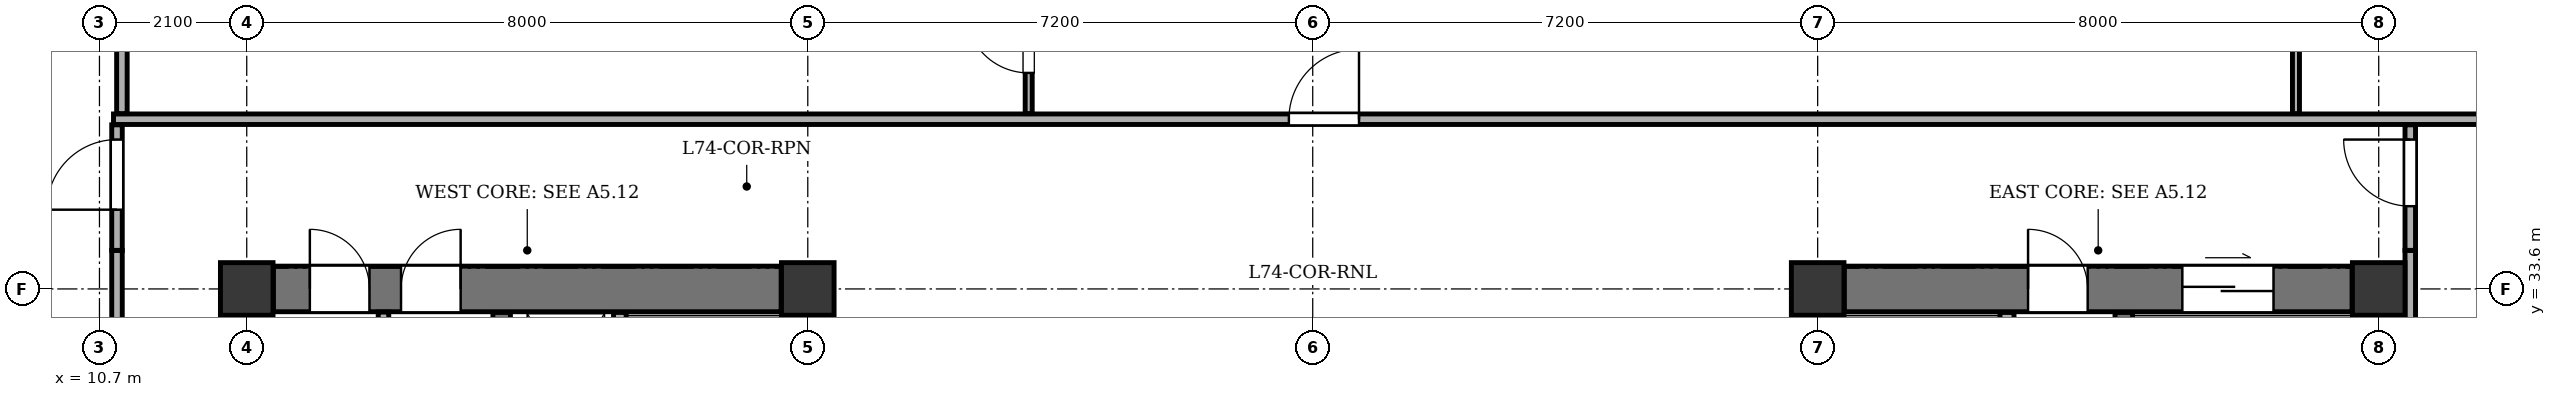
"""IFC4 building model, lengths in metres.
Left out: names, types, materials, properties, quantities, classifications, styles, units other than length and angle.
Written with IfcOpenShell. Run it as: python <this file> out.ifc"""

import sys

from ifc_helpers import new_model, si_unit, direction, frame, frame_2d, origin, origin_2d, place, context, subcontext, project, spatial, rectangle, extrude, element, fill, save


model = new_model("IFC4")
c1 = context("Model", 3, precision=1e-05, world=origin(), true_north=direction((0.0, 1.0)))
c2 = subcontext(c1, "Body", "Model", "MODEL_VIEW")
j1 = project(units=[si_unit("LENGTHUNIT", "METRE"), si_unit("PLANEANGLEUNIT", "RADIAN")], contexts=[c1])
p1 = place(None, origin())
s1 = spatial("IfcSite", under=j1, at=p1, CompositionType="ELEMENT")
p2 = place(p1, origin())
s2 = spatial("IfcBuilding", under=s1, at=p2, CompositionType="ELEMENT")
p3 = place(p2, frame((0.0, 0.0, 278.9)))
s3 = spatial("IfcBuildingStorey", under=s2, at=p3, CompositionType="ELEMENT", Elevation=278.9)
for number, where, z_axis, x_axis in (
    (1, (12.8, 33.6, 0.0), (0.0, 0.0, 1.0), (1.0, 0.0, 0.0)),
    (2, (20.8, 33.6, 0.0), (0.0, 0.0, 1.0), (1.0, 0.0, 0.0)),
    (3, (35.2, 33.6, 0.0), (0.0, 0.0, 1.0), (1.0, 0.0, 0.0)),
    (4, (43.2, 33.6, 0.0), (0.0, 0.0, 1.0), (1.0, 0.0, 0.0)),
):
    element("IfcColumn", number, at=place(p3, frame(where, z_axis=z_axis, x_axis=x_axis)), inside=s3, PredefinedType="COLUMN", context=c2, shape_type="SweptSolid", body=[
        extrude(rectangle(XDim=0.75, YDim=0.75, at=origin_2d()), origin(), (0.0, 0.0, 1.0), 3.4),
    ])
p4 = place(p3, frame((12.8, 21.18, 0.0), z_axis=(0.0, 0.0, 1.0), x_axis=(0.0, 1.0, 0.0)))
e5 = element("IfcWall", 5, at=p4, inside=s3, PredefinedType="SHEAR", context=c2, shape_type="SweptSolid", body=[
    extrude(rectangle(XDim=12.04, YDim=0.65, at=frame_2d((6.02, 0.0))), origin(), (0.0, 0.0, 1.0), 2.95),
])
p5 = place(p3, frame((13.18, 33.6, 0.0), z_axis=(0.0, 0.0, 1.0), x_axis=(1.0, 0.0, 0.0)))
e6 = element("IfcWall", 6, at=p5, inside=s3, PredefinedType="SHEAR", context=c2, shape_type="SweptSolid", body=[
    extrude(rectangle(XDim=7.24, YDim=0.65, at=frame_2d((3.62, 0.0))), origin(), (0.0, 0.0, 1.0), 2.95),
])
p6 = place(p5, frame((0.52, 0.0, 0.0)))
e7 = element("IfcOpeningElement", 7, at=p6, cuts=e6, PredefinedType="OPENING", context=c2, shape_type="SweptSolid", body=[
    extrude(rectangle(XDim=0.85, YDim=2.02, at=frame_2d((0.425, 1.01))), frame((0.0, 0.335, 0.0), z_axis=(0.0, -1.0, 0.0), x_axis=(1.0, 0.0, 0.0)), (0.0, 0.0, 1.0), 0.67),
])
p7 = place(p5, frame((1.82, 0.0, 0.0)))
e8 = element("IfcOpeningElement", 8, at=p7, cuts=e6, PredefinedType="OPENING", context=c2, shape_type="SweptSolid", body=[
    extrude(rectangle(XDim=0.85, YDim=2.02, at=frame_2d((0.425, 1.01))), frame((0.0, 0.335, 0.0), z_axis=(0.0, -1.0, 0.0), x_axis=(1.0, 0.0, 0.0)), (0.0, 0.0, 1.0), 0.67),
])
p8 = place(p3, frame((20.8, 31.1, 0.0), z_axis=(0.0, 0.0, 1.0), x_axis=(0.0, 1.0, 0.0)))
e9 = element("IfcWall", 9, at=p8, inside=s3, PredefinedType="SHEAR", context=c2, shape_type="SweptSolid", body=[
    extrude(rectangle(XDim=2.12, YDim=0.65, at=frame_2d((1.06, 0.0))), origin(), (0.0, 0.0, 1.0), 2.95),
])
p9 = place(p8, frame((0.4, 0.0, 0.0)))
e10 = element("IfcOpeningElement", 10, at=p9, cuts=e9, PredefinedType="OPENING", context=c2, shape_type="SweptSolid", body=[
    extrude(rectangle(XDim=1.1, YDim=2.1, at=frame_2d((0.55, 1.05))), frame((0.0, 0.335, 0.0), z_axis=(0.0, -1.0, 0.0), x_axis=(1.0, 0.0, 0.0)), (0.0, 0.0, 1.0), 0.67),
])
p10 = place(p3, frame((16.435, 21.135, 0.0), z_axis=(0.0, 0.0, 1.0), x_axis=(0.0, 1.0, 0.0)))
e11 = element("IfcWall", 11, at=p10, inside=s3, PredefinedType="SHEAR", context=c2, shape_type="SweptSolid", body=[
    extrude(rectangle(XDim=12.13, YDim=0.25, at=frame_2d((6.065, 0.0))), origin(), (0.0, 0.0, 1.0), 2.95),
])
p11 = place(p10, frame((0.515, 0.0, 0.0)))
e12 = element("IfcOpeningElement", 12, at=p11, cuts=e11, PredefinedType="OPENING", context=c2, shape_type="SweptSolid", body=[
    extrude(rectangle(XDim=1.2, YDim=2.15, at=frame_2d((0.6, 1.075))), frame((0.0, 0.135, 0.0), z_axis=(0.0, -1.0, 0.0), x_axis=(1.0, 0.0, 0.0)), (0.0, 0.0, 1.0), 0.27),
])
p12 = place(p10, frame((2.665, 0.0, 0.0)))
e13 = element("IfcOpeningElement", 13, at=p12, cuts=e11, PredefinedType="OPENING", context=c2, shape_type="SweptSolid", body=[
    extrude(rectangle(XDim=1.15, YDim=2.15, at=frame_2d((0.575, 1.075))), frame((0.0, 0.135, 0.0), z_axis=(0.0, -1.0, 0.0), x_axis=(1.0, 0.0, 0.0)), (0.0, 0.0, 1.0), 0.27),
])
p13 = place(p3, frame((18.12, 31.17, 0.0), z_axis=(0.0, 0.0, 1.0), x_axis=(0.0, 1.0, 0.0)))
e14 = element("IfcWall", 14, at=p13, inside=s3, PredefinedType="PARTITIONING", context=c2, shape_type="SweptSolid", body=[
    extrude(rectangle(XDim=2.095, YDim=0.18, at=frame_2d((1.047, 0.0))), origin(), (0.0, 0.0, 1.0), 2.95),
])
p14 = place(p3, frame((43.2, 21.18, 0.0), z_axis=(0.0, 0.0, 1.0), x_axis=(0.0, 1.0, 0.0)))
e15 = element("IfcWall", 15, at=p14, inside=s3, PredefinedType="SHEAR", context=c2, shape_type="SweptSolid", body=[
    extrude(rectangle(XDim=12.04, YDim=0.65, at=frame_2d((6.02, 0.0))), origin(), (0.0, 0.0, 1.0), 2.95),
])
p15 = place(p3, frame((35.58, 33.6, 0.0), z_axis=(0.0, 0.0, 1.0), x_axis=(1.0, 0.0, 0.0)))
e16 = element("IfcWall", 16, at=p15, inside=s3, PredefinedType="SHEAR", context=c2, shape_type="SweptSolid", body=[
    extrude(rectangle(XDim=7.24, YDim=0.65, at=frame_2d((3.62, 0.0))), origin(), (0.0, 0.0, 1.0), 2.95),
])
p16 = place(p15, frame((4.82, 0.0, 0.0)))
e17 = element("IfcOpeningElement", 17, at=p16, cuts=e16, PredefinedType="OPENING", context=c2, shape_type="SweptSolid", body=[
    extrude(rectangle(XDim=1.3, YDim=2.15, at=frame_2d((0.65, 1.075))), frame((0.0, 0.335, 0.0), z_axis=(0.0, -1.0, 0.0), x_axis=(1.0, 0.0, 0.0)), (0.0, 0.0, 1.0), 0.67),
])
p17 = place(p15, frame((2.62, 0.0, 0.0)))
e18 = element("IfcOpeningElement", 18, at=p17, cuts=e16, PredefinedType="OPENING", context=c2, shape_type="SweptSolid", body=[
    extrude(rectangle(XDim=0.85, YDim=2.02, at=frame_2d((0.425, 1.01))), frame((0.0, 0.335, 0.0), z_axis=(0.0, -1.0, 0.0), x_axis=(1.0, 0.0, 0.0)), (0.0, 0.0, 1.0), 0.67),
])
p18 = place(p3, frame((35.2, 31.1, 0.0), z_axis=(0.0, 0.0, 1.0), x_axis=(0.0, 1.0, 0.0)))
e19 = element("IfcWall", 19, at=p18, inside=s3, PredefinedType="SHEAR", context=c2, shape_type="SweptSolid", body=[
    extrude(rectangle(XDim=2.12, YDim=0.65, at=frame_2d((1.06, 0.0))), origin(), (0.0, 0.0, 1.0), 2.95),
])
p19 = place(p18, frame((0.4, 0.0, 0.0)))
e20 = element("IfcOpeningElement", 20, at=p19, cuts=e19, PredefinedType="OPENING", context=c2, shape_type="SweptSolid", body=[
    extrude(rectangle(XDim=1.1, YDim=2.1, at=frame_2d((0.55, 1.05))), frame((0.0, 0.335, 0.0), z_axis=(0.0, -1.0, 0.0), x_axis=(1.0, 0.0, 0.0)), (0.0, 0.0, 1.0), 0.67),
])
p20 = place(p3, frame((39.565, 21.135, 0.0), z_axis=(0.0, 0.0, 1.0), x_axis=(0.0, 1.0, 0.0)))
e21 = element("IfcWall", 21, at=p20, inside=s3, PredefinedType="SHEAR", context=c2, shape_type="SweptSolid", body=[
    extrude(rectangle(XDim=12.13, YDim=0.25, at=frame_2d((6.065, 0.0))), origin(), (0.0, 0.0, 1.0), 2.95),
])
p21 = place(p20, frame((0.515, 0.0, 0.0)))
e22 = element("IfcOpeningElement", 22, at=p21, cuts=e21, PredefinedType="OPENING", context=c2, shape_type="SweptSolid", body=[
    extrude(rectangle(XDim=1.2, YDim=2.15, at=frame_2d((0.6, 1.075))), frame((0.0, 0.135, 0.0), z_axis=(0.0, -1.0, 0.0), x_axis=(1.0, 0.0, 0.0)), (0.0, 0.0, 1.0), 0.27),
])
p22 = place(p20, frame((2.665, 0.0, 0.0)))
e23 = element("IfcOpeningElement", 23, at=p22, cuts=e21, PredefinedType="OPENING", context=c2, shape_type="SweptSolid", body=[
    extrude(rectangle(XDim=1.15, YDim=2.15, at=frame_2d((0.575, 1.075))), frame((0.0, 0.135, 0.0), z_axis=(0.0, -1.0, 0.0), x_axis=(1.0, 0.0, 0.0)), (0.0, 0.0, 1.0), 0.27),
])
p23 = place(p3, frame((37.9, 25.27, 0.0), z_axis=(0.0, 0.0, 1.0), x_axis=(0.0, 1.0, 0.0)))
e24 = element("IfcWall", 24, at=p23, inside=s3, PredefinedType="SOLIDWALL", context=c2, shape_type="SweptSolid", body=[
    extrude(rectangle(XDim=7.995, YDim=0.2, at=frame_2d((3.998, 0.0))), origin(), (0.0, 0.0, 1.0), 2.95),
])
p24 = place(p3, frame((14.75, 30.96, 0.0), z_axis=(0.0, 0.0, 1.0), x_axis=(0.0, 1.0, 0.0)))
e25 = element("IfcWall", 25, at=p24, inside=s3, PredefinedType="PARTITIONING", context=c2, shape_type="SweptSolid", body=[
    extrude(rectangle(XDim=2.31, YDim=0.15, at=frame_2d((1.155, 0.0))), origin(), (0.0, 0.0, 1.0), 2.95),
])
p25 = place(p24, frame((0.47, 0.0, 0.0)))
e26 = element("IfcOpeningElement", 26, at=p25, cuts=e25, PredefinedType="OPENING", context=c2, shape_type="SweptSolid", body=[
    extrude(rectangle(XDim=0.85, YDim=2.02, at=frame_2d((0.425, 1.01))), frame((0.0, 0.085, 0.0), z_axis=(0.0, -1.0, 0.0), x_axis=(1.0, 0.0, 0.0)), (0.0, 0.0, 1.0), 0.17),
])
p26 = place(p3, frame((10.9, 36.02, 0.0), z_axis=(0.0, 0.0, 1.0), x_axis=(1.0, 0.0, 0.0)))
e27 = element("IfcWall", 27, at=p26, inside=s3, PredefinedType="PARTITIONING", context=c2, shape_type="SweptSolid", body=[
    extrude(rectangle(XDim=34.52, YDim=0.15, at=frame_2d((17.26, 0.0))), origin(), (0.0, 0.0, 1.0), 2.95),
])
p27 = place(p26, frame((16.76, 0.0, 0.0)))
e28 = element("IfcOpeningElement", 28, at=p27, cuts=e27, PredefinedType="OPENING", context=c2, shape_type="SweptSolid", body=[
    extrude(rectangle(XDim=1.0, YDim=2.1, at=frame_2d((0.5, 1.05))), frame((0.0, 0.085, 0.0), z_axis=(0.0, -1.0, 0.0), x_axis=(1.0, 0.0, 0.0)), (0.0, 0.0, 1.0), 0.17),
])
p28 = place(p3, frame((11.02, 36.1, 0.0), z_axis=(0.0, 0.0, 1.0), x_axis=(0.0, 1.0, 0.0)))
e29 = element("IfcWall", 29, at=p28, inside=s3, PredefinedType="PARTITIONING", context=c2, shape_type="SweptSolid", body=[
    extrude(rectangle(XDim=8.655, YDim=0.15, at=frame_2d((4.327, 0.0))), origin(), (0.0, 0.0, 1.0), 2.95),
])
p29 = place(p3, frame((42.02, 36.1, 0.0), z_axis=(0.0, 0.0, 1.0), x_axis=(0.0, 1.0, 0.0)))
e30 = element("IfcWall", 30, at=p29, inside=s3, PredefinedType="PARTITIONING", context=c2, shape_type="SweptSolid", body=[
    extrude(rectangle(XDim=6.095, YDim=0.1, at=frame_2d((3.047, 0.0))), origin(), (0.0, 0.0, 1.0), 2.575),
])
p30 = place(p29, frame((2.585, 0.0, 0.0)))
e31 = element("IfcOpeningElement", 31, at=p30, cuts=e30, PredefinedType="OPENING", context=c2, shape_type="SweptSolid", body=[
    extrude(rectangle(XDim=0.9, YDim=2.05, at=frame_2d((0.45, 1.025))), frame((0.0, 0.06, 0.0), z_axis=(0.0, -1.0, 0.0), x_axis=(1.0, 0.0, 0.0)), (0.0, 0.0, 1.0), 0.12),
])
p31 = place(p3, frame((23.95, 36.1, 0.0), z_axis=(0.0, 0.0, 1.0), x_axis=(0.0, 1.0, 0.0)))
e32 = element("IfcWall", 32, at=p31, inside=s3, PredefinedType="PARTITIONING", context=c2, shape_type="SweptSolid", body=[
    extrude(rectangle(XDim=6.095, YDim=0.1, at=frame_2d((3.047, 0.0))), origin(), (0.0, 0.0, 1.0), 2.95),
])
p32 = place(p31, frame((0.58, 0.0, 0.0)))
e33 = element("IfcOpeningElement", 33, at=p32, cuts=e32, PredefinedType="OPENING", context=c2, shape_type="SweptSolid", body=[
    extrude(rectangle(XDim=0.9, YDim=2.05, at=frame_2d((0.45, 1.025))), frame((0.0, 0.06, 0.0), z_axis=(0.0, -1.0, 0.0), x_axis=(1.0, 0.0, 0.0)), (0.0, 0.0, 1.0), 0.12),
])
p33 = place(p3, frame((10.95, 20.25, 0.0), z_axis=(0.0, 0.0, 1.0), x_axis=(0.0, 1.0, 0.0)))
e34 = element("IfcWall", 34, at=p33, inside=s3, PredefinedType="PARTITIONING", context=c2, shape_type="SweptSolid", body=[
    extrude(rectangle(XDim=13.9, YDim=0.15, at=frame_2d((6.95, 0.0))), origin(), (0.0, 0.0, 1.0), 2.95),
])
p34 = place(p3, frame((10.95, 34.15, 0.0), z_axis=(0.0, 0.0, 1.0), x_axis=(0.0, 1.0, 0.0)))
e35 = element("IfcWall", 35, at=p34, inside=s3, PredefinedType="PARTITIONING", context=c2, shape_type="SweptSolid", body=[
    extrude(rectangle(XDim=1.79, YDim=0.15, at=frame_2d((0.895, 0.0))), origin(), (0.0, 0.0, 1.0), 2.95),
])
p35 = place(p34, frame((0.58, 0.0, 0.0)))
e36 = element("IfcOpeningElement", 36, at=p35, cuts=e35, PredefinedType="OPENING", context=c2, shape_type="SweptSolid", body=[
    extrude(rectangle(XDim=1.0, YDim=2.1, at=frame_2d((0.5, 1.05))), frame((0.0, 0.085, 0.0), z_axis=(0.0, -1.0, 0.0), x_axis=(1.0, 0.0, 0.0)), (0.0, 0.0, 1.0), 0.17),
])
p36 = place(p3, frame((43.65, 20.88, 0.0), z_axis=(0.0, 0.0, 1.0), x_axis=(0.0, 1.0, 0.0)))
e37 = element("IfcWall", 37, at=p36, inside=s3, PredefinedType="PARTITIONING", context=c2, shape_type="SweptSolid", body=[
    extrude(rectangle(XDim=13.27, YDim=0.15, at=frame_2d((6.635, 0.0))), origin(), (0.0, 0.0, 1.0), 2.95),
])
p37 = place(p3, frame((43.65, 34.15, 0.0), z_axis=(0.0, 0.0, 1.0), x_axis=(0.0, 1.0, 0.0)))
e38 = element("IfcWall", 38, at=p37, inside=s3, PredefinedType="PARTITIONING", context=c2, shape_type="SweptSolid", body=[
    extrude(rectangle(XDim=1.79, YDim=0.15, at=frame_2d((0.895, 0.0))), origin(), (0.0, 0.0, 1.0), 2.95),
])
p38 = place(p37, frame((0.63, 0.0, 0.0)))
e39 = element("IfcOpeningElement", 39, at=p38, cuts=e38, PredefinedType="OPENING", context=c2, shape_type="SweptSolid", body=[
    extrude(rectangle(XDim=0.95, YDim=2.1, at=frame_2d((0.475, 1.05))), frame((0.0, 0.085, 0.0), z_axis=(0.0, -1.0, 0.0), x_axis=(1.0, 0.0, 0.0)), (0.0, 0.0, 1.0), 0.17),
])
p39 = place(p6, origin())
e40 = element("IfcDoor", 40, at=p39, inside=s3, OperationType="SINGLE_SWING_LEFT", PredefinedType="DOOR", context=c2, shape_type="SweptSolid", body=[
    extrude(rectangle(XDim=0.85, YDim=2.02, at=frame_2d((0.425, 1.01))), frame((0.0, 0.025, 0.0), z_axis=(0.0, -1.0, 0.0), x_axis=(1.0, 0.0, 0.0)), (0.0, 0.0, 1.0), 0.05),
])
fill(e7, e40)
p40 = place(p7, origin())
e41 = element("IfcDoor", 41, at=p40, inside=s3, OperationType="SINGLE_SWING_RIGHT", PredefinedType="DOOR", context=c2, shape_type="SweptSolid", body=[
    extrude(rectangle(XDim=0.85, YDim=2.02, at=frame_2d((0.425, 1.01))), frame((0.0, 0.025, 0.0), z_axis=(0.0, -1.0, 0.0), x_axis=(1.0, 0.0, 0.0)), (0.0, 0.0, 1.0), 0.05),
])
fill(e8, e41)
p41 = place(p16, origin())
e42 = element("IfcDoor", 42, at=p41, inside=s3, OperationType="DOUBLE_DOOR_SLIDING", PredefinedType="DOOR", context=c2, shape_type="SweptSolid", body=[
    extrude(rectangle(XDim=1.3, YDim=2.15, at=frame_2d((0.65, 1.075))), frame((0.0, 0.025, 0.0), z_axis=(0.0, -1.0, 0.0), x_axis=(1.0, 0.0, 0.0)), (0.0, 0.0, 1.0), 0.05),
])
fill(e17, e42)
p42 = place(p17, origin())
e43 = element("IfcDoor", 43, at=p42, inside=s3, OperationType="SINGLE_SWING_LEFT", PredefinedType="DOOR", context=c2, shape_type="SweptSolid", body=[
    extrude(rectangle(XDim=0.85, YDim=2.02, at=frame_2d((0.425, 1.01))), frame((0.0, 0.025, 0.0), z_axis=(0.0, -1.0, 0.0), x_axis=(1.0, 0.0, 0.0)), (0.0, 0.0, 1.0), 0.05),
])
fill(e18, e43)
p43 = place(p27, origin())
e44 = element("IfcDoor", 44, at=p43, inside=s3, OperationType="SINGLE_SWING_RIGHT", PredefinedType="DOOR", context=c2, shape_type="SweptSolid", body=[
    extrude(rectangle(XDim=1.0, YDim=2.1, at=frame_2d((0.5, 1.05))), frame((0.0, 0.025, 0.0), z_axis=(0.0, -1.0, 0.0), x_axis=(1.0, 0.0, 0.0)), (0.0, 0.0, 1.0), 0.05),
])
fill(e28, e44)
p44 = place(p32, origin())
e45 = element("IfcDoor", 45, at=p44, inside=s3, OperationType="SINGLE_SWING_RIGHT", PredefinedType="DOOR", context=c2, shape_type="SweptSolid", body=[
    extrude(rectangle(XDim=0.9, YDim=2.05, at=frame_2d((0.45, 1.025))), frame((0.0, 0.025, 0.0), z_axis=(0.0, -1.0, 0.0), x_axis=(1.0, 0.0, 0.0)), (0.0, 0.0, 1.0), 0.05),
])
fill(e33, e45)
p45 = place(p35, origin())
e46 = element("IfcDoor", 46, at=p45, inside=s3, OperationType="SINGLE_SWING_LEFT", PredefinedType="DOOR", context=c2, shape_type="SweptSolid", body=[
    extrude(rectangle(XDim=1.0, YDim=2.1, at=frame_2d((0.5, 1.05))), frame((0.0, 0.025, 0.0), z_axis=(0.0, -1.0, 0.0), x_axis=(1.0, 0.0, 0.0)), (0.0, 0.0, 1.0), 0.05),
])
fill(e36, e46)
p46 = place(p38, origin())
e47 = element("IfcDoor", 47, at=p46, inside=s3, OperationType="SINGLE_SWING_RIGHT", PredefinedType="DOOR", context=c2, shape_type="SweptSolid", body=[
    extrude(rectangle(XDim=0.95, YDim=2.1, at=frame_2d((0.475, 1.05))), frame((0.0, 0.025, 0.0), z_axis=(0.0, -1.0, 0.0), x_axis=(1.0, 0.0, 0.0)), (0.0, 0.0, 1.0), 0.05),
])
fill(e39, e47)
save(model, sys.argv[1])
